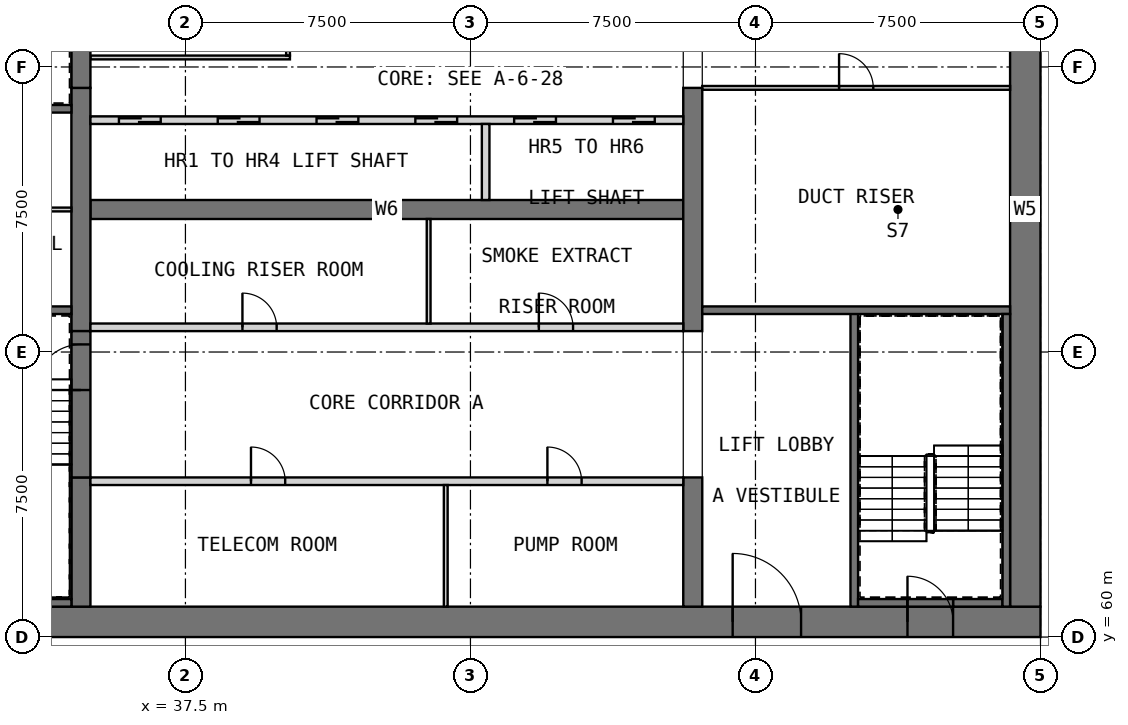
"""IFC4 building model, lengths in metres.
Left out: names, types, materials, properties, quantities, classifications, styles, units other than length and angle.
Written with IfcOpenShell. Run it as: python <this file> out.ifc"""

import sys

from ifc_helpers import new_model, si_unit, direction, frame, frame_2d, origin, place, context, subcontext, project, spatial, rectangle, extrude, element, fill, save


model = new_model("IFC4")
c1 = context("Model", 3, precision=1e-05, world=origin(), true_north=direction((0.0, 1.0)))
c2 = subcontext(c1, "Body", "Model", "MODEL_VIEW")
j1 = project(units=[si_unit("LENGTHUNIT", "METRE"), si_unit("PLANEANGLEUNIT", "RADIAN")], contexts=[c1])
p1 = place(None, origin())
s1 = spatial("IfcSite", under=j1, at=p1, CompositionType="ELEMENT")
p2 = place(p1, origin())
s2 = spatial("IfcBuilding", under=s1, at=p2, CompositionType="ELEMENT")
p3 = place(p2, frame((0.0, 0.0, 214.2)))
s3 = spatial("IfcBuildingStorey", under=s2, at=p3, CompositionType="ELEMENT", Elevation=214.2)
p4 = place(p3, frame((30.0, 60.4, 0.0), z_axis=(0.0, 0.0, 1.0), x_axis=(1.0, 0.0, 0.0)))
e1 = element("IfcWall", 1, at=p4, inside=s3, PredefinedType="SHEAR", context=c2, shape_type="SweptSolid", body=[
    extrude(rectangle(XDim=30.0, YDim=0.8, at=frame_2d((15.0, 0.0))), origin(), (0.0, 0.0, 1.0), 5.5),
])
p5 = place(p4, frame((21.9, 0.0, 0.0)))
e2 = element("IfcOpeningElement", 2, at=p5, cuts=e1, PredefinedType="OPENING", context=c2, shape_type="SweptSolid", body=[
    extrude(rectangle(XDim=1.8, YDim=2.1, at=frame_2d((0.9, 1.05))), frame((0.0, 0.41, 0.0), z_axis=(0.0, -1.0, 0.0), x_axis=(1.0, 0.0, 0.0)), (0.0, 0.0, 1.0), 0.82),
])
p6 = place(p4, frame((26.5, 0.0, 0.0)))
e3 = element("IfcOpeningElement", 3, at=p6, cuts=e1, PredefinedType="OPENING", context=c2, shape_type="SweptSolid", body=[
    extrude(rectangle(XDim=1.2, YDim=2.1, at=frame_2d((0.6, 1.05))), frame((0.0, 0.41, 0.0), z_axis=(0.0, -1.0, 0.0), x_axis=(1.0, 0.0, 0.0)), (0.0, 0.0, 1.0), 0.82),
])
p7 = place(p3, frame((59.6, 60.8, 0.0), z_axis=(0.0, 0.0, 1.0), x_axis=(0.0, 1.0, 0.0)))
e4 = element("IfcWall", 4, at=p7, inside=s3, PredefinedType="SHEAR", context=c2, shape_type="SweptSolid", body=[
    extrude(rectangle(XDim=20.9, YDim=0.8, at=frame_2d((10.45, 0.0))), origin(), (0.0, 0.0, 1.0), 5.5),
])
p8 = place(p7, frame((14.7, 0.0, 0.0)))
e5 = element("IfcOpeningElement", 5, at=p8, cuts=e4, PredefinedType="OPENING", context=c2, shape_type="SweptSolid", body=[
    extrude(rectangle(XDim=1.8, YDim=2.1, at=frame_2d((0.9, 1.05))), frame((0.0, 0.41, 0.0), z_axis=(0.0, -1.0, 0.0), x_axis=(1.0, 0.0, 0.0)), (0.0, 0.0, 1.0), 0.82),
])
p9 = place(p3, frame((35.0, 71.25, 0.0), z_axis=(0.0, 0.0, 1.0), x_axis=(1.0, 0.0, 0.0)))
e6 = element("IfcWall", 6, at=p9, inside=s3, PredefinedType="SHEAR", context=c2, shape_type="SweptSolid", body=[
    extrude(rectangle(XDim=15.6, YDim=0.5, at=frame_2d((7.8, 0.0))), origin(), (0.0, 0.0, 1.0), 5.5),
])
p10 = place(p3, frame((34.75, 60.8, 0.0), z_axis=(0.0, 0.0, 1.0), x_axis=(0.0, 1.0, 0.0)))
e7 = element("IfcWall", 7, at=p10, inside=s3, PredefinedType="SHEAR", context=c2, shape_type="SweptSolid", body=[
    extrude(rectangle(XDim=3.4, YDim=0.5, at=frame_2d((1.7, 0.0))), origin(), (0.0, 0.0, 1.0), 5.5),
])
p11 = place(p3, frame((34.75, 68.05, 0.0), z_axis=(0.0, 0.0, 1.0), x_axis=(0.0, 1.0, 0.0)))
e8 = element("IfcWall", 8, at=p11, inside=s3, PredefinedType="SHEAR", context=c2, shape_type="SweptSolid", body=[
    extrude(rectangle(XDim=6.4, YDim=0.5, at=frame_2d((3.2, 0.0))), origin(), (0.0, 0.0, 1.0), 5.5),
])
p12 = place(p3, frame((50.85, 60.8, 0.0), z_axis=(0.0, 0.0, 1.0), x_axis=(0.0, 1.0, 0.0)))
e9 = element("IfcWall", 9, at=p12, inside=s3, PredefinedType="SHEAR", context=c2, shape_type="SweptSolid", body=[
    extrude(rectangle(XDim=3.4, YDim=0.5, at=frame_2d((1.7, 0.0))), origin(), (0.0, 0.0, 1.0), 5.5),
])
p13 = place(p3, frame((50.85, 68.05, 0.0), z_axis=(0.0, 0.0, 1.0), x_axis=(0.0, 1.0, 0.0)))
e10 = element("IfcWall", 10, at=p13, inside=s3, PredefinedType="SHEAR", context=c2, shape_type="SweptSolid", body=[
    extrude(rectangle(XDim=6.4, YDim=0.5, at=frame_2d((3.2, 0.0))), origin(), (0.0, 0.0, 1.0), 5.5),
])
p14 = place(p3, frame((35.0, 64.1, 0.0), z_axis=(0.0, 0.0, 1.0), x_axis=(1.0, 0.0, 0.0)))
e11 = element("IfcWall", 11, at=p14, inside=s3, PredefinedType="PARTITIONING", context=c2, shape_type="SweptSolid", body=[
    extrude(rectangle(XDim=15.6, YDim=0.2, at=frame_2d((7.8, 0.0))), origin(), (0.0, 0.0, 1.0), 5.25),
])
p15 = place(p14, frame((4.225, 0.0, 0.0)))
e12 = element("IfcOpeningElement", 12, at=p15, cuts=e11, PredefinedType="OPENING", context=c2, shape_type="SweptSolid", body=[
    extrude(rectangle(XDim=0.9, YDim=2.1, at=frame_2d((0.45, 1.05))), frame((0.0, 0.11, 0.0), z_axis=(0.0, -1.0, 0.0), x_axis=(1.0, 0.0, 0.0)), (0.0, 0.0, 1.0), 0.22),
])
p16 = place(p14, frame((12.025, 0.0, 0.0)))
e13 = element("IfcOpeningElement", 13, at=p16, cuts=e11, PredefinedType="OPENING", context=c2, shape_type="SweptSolid", body=[
    extrude(rectangle(XDim=0.9, YDim=2.1, at=frame_2d((0.45, 1.05))), frame((0.0, 0.11, 0.0), z_axis=(0.0, -1.0, 0.0), x_axis=(1.0, 0.0, 0.0)), (0.0, 0.0, 1.0), 0.22),
])
p17 = place(p3, frame((44.35, 60.8, 0.0), z_axis=(0.0, 0.0, 1.0), x_axis=(0.0, 1.0, 0.0)))
e14 = element("IfcWall", 14, at=p17, inside=s3, PredefinedType="PARTITIONING", context=c2, shape_type="SweptSolid", body=[
    extrude(rectangle(XDim=3.2, YDim=0.1, at=frame_2d((1.6, 0.0))), origin(), (0.0, 0.0, 1.0), 5.25),
])
p18 = place(p3, frame((35.0, 68.15, 0.0), z_axis=(0.0, 0.0, 1.0), x_axis=(1.0, 0.0, 0.0)))
e15 = element("IfcWall", 15, at=p18, inside=s3, PredefinedType="PARTITIONING", context=c2, shape_type="SweptSolid", body=[
    extrude(rectangle(XDim=15.6, YDim=0.2, at=frame_2d((7.8, 0.0))), origin(), (0.0, 0.0, 1.0), 5.25),
])
p19 = place(p18, frame((4.0, 0.0, 0.0)))
e16 = element("IfcOpeningElement", 16, at=p19, cuts=e15, PredefinedType="OPENING", context=c2, shape_type="SweptSolid", body=[
    extrude(rectangle(XDim=0.9, YDim=2.1, at=frame_2d((0.45, 1.05))), frame((0.0, 0.11, 0.0), z_axis=(0.0, -1.0, 0.0), x_axis=(1.0, 0.0, 0.0)), (0.0, 0.0, 1.0), 0.22),
])
p20 = place(p18, frame((11.8, 0.0, 0.0)))
e17 = element("IfcOpeningElement", 17, at=p20, cuts=e15, PredefinedType="OPENING", context=c2, shape_type="SweptSolid", body=[
    extrude(rectangle(XDim=0.9, YDim=2.1, at=frame_2d((0.45, 1.05))), frame((0.0, 0.11, 0.0), z_axis=(0.0, -1.0, 0.0), x_axis=(1.0, 0.0, 0.0)), (0.0, 0.0, 1.0), 0.22),
])
p21 = place(p3, frame((43.9, 68.25, 0.0), z_axis=(0.0, 0.0, 1.0), x_axis=(0.0, 1.0, 0.0)))
e18 = element("IfcWall", 18, at=p21, inside=s3, PredefinedType="PARTITIONING", context=c2, shape_type="SweptSolid", body=[
    extrude(rectangle(XDim=2.75, YDim=0.1, at=frame_2d((1.375, 0.0))), origin(), (0.0, 0.0, 1.0), 5.25),
])
p22 = place(p3, frame((35.0, 73.6, 0.0), z_axis=(0.0, 0.0, 1.0), x_axis=(1.0, 0.0, 0.0)))
e19 = element("IfcWall", 19, at=p22, inside=s3, PredefinedType="SOLIDWALL", context=c2, shape_type="SweptSolid", body=[
    extrude(rectangle(XDim=15.6, YDim=0.2, at=frame_2d((7.8, 0.0))), origin(), (0.0, 0.0, 1.0), 5.5),
])
p23 = place(p22, frame((0.75, 0.0, 0.0)))
e20 = element("IfcOpeningElement", 20, at=p23, cuts=e19, PredefinedType="OPENING", context=c2, shape_type="SweptSolid", body=[
    extrude(rectangle(XDim=1.1, YDim=2.1, at=frame_2d((0.55, 1.05))), frame((0.0, 0.11, 0.0), z_axis=(0.0, -1.0, 0.0), x_axis=(1.0, 0.0, 0.0)), (0.0, 0.0, 1.0), 0.22),
])
p24 = place(p22, frame((3.35, 0.0, 0.0)))
e21 = element("IfcOpeningElement", 21, at=p24, cuts=e19, PredefinedType="OPENING", context=c2, shape_type="SweptSolid", body=[
    extrude(rectangle(XDim=1.1, YDim=2.1, at=frame_2d((0.55, 1.05))), frame((0.0, 0.11, 0.0), z_axis=(0.0, -1.0, 0.0), x_axis=(1.0, 0.0, 0.0)), (0.0, 0.0, 1.0), 0.22),
])
p25 = place(p22, frame((5.95, 0.0, 0.0)))
e22 = element("IfcOpeningElement", 22, at=p25, cuts=e19, PredefinedType="OPENING", context=c2, shape_type="SweptSolid", body=[
    extrude(rectangle(XDim=1.1, YDim=2.1, at=frame_2d((0.55, 1.05))), frame((0.0, 0.11, 0.0), z_axis=(0.0, -1.0, 0.0), x_axis=(1.0, 0.0, 0.0)), (0.0, 0.0, 1.0), 0.22),
])
p26 = place(p22, frame((8.55, 0.0, 0.0)))
e23 = element("IfcOpeningElement", 23, at=p26, cuts=e19, PredefinedType="OPENING", context=c2, shape_type="SweptSolid", body=[
    extrude(rectangle(XDim=1.1, YDim=2.1, at=frame_2d((0.55, 1.05))), frame((0.0, 0.11, 0.0), z_axis=(0.0, -1.0, 0.0), x_axis=(1.0, 0.0, 0.0)), (0.0, 0.0, 1.0), 0.22),
])
p27 = place(p22, frame((11.15, 0.0, 0.0)))
e24 = element("IfcOpeningElement", 24, at=p27, cuts=e19, PredefinedType="OPENING", context=c2, shape_type="SweptSolid", body=[
    extrude(rectangle(XDim=1.1, YDim=2.1, at=frame_2d((0.55, 1.05))), frame((0.0, 0.11, 0.0), z_axis=(0.0, -1.0, 0.0), x_axis=(1.0, 0.0, 0.0)), (0.0, 0.0, 1.0), 0.22),
])
p28 = place(p22, frame((13.75, 0.0, 0.0)))
e25 = element("IfcOpeningElement", 25, at=p28, cuts=e19, PredefinedType="OPENING", context=c2, shape_type="SweptSolid", body=[
    extrude(rectangle(XDim=1.1, YDim=2.1, at=frame_2d((0.55, 1.05))), frame((0.0, 0.11, 0.0), z_axis=(0.0, -1.0, 0.0), x_axis=(1.0, 0.0, 0.0)), (0.0, 0.0, 1.0), 0.22),
])
p29 = place(p3, frame((45.4, 71.5, 0.0), z_axis=(0.0, 0.0, 1.0), x_axis=(0.0, 1.0, 0.0)))
e26 = element("IfcWall", 26, at=p29, inside=s3, PredefinedType="SOLIDWALL", context=c2, shape_type="SweptSolid", body=[
    extrude(rectangle(XDim=2.0, YDim=0.2, at=frame_2d((1.0, 0.0))), origin(), (0.0, 0.0, 1.0), 5.5),
])
p30 = place(p3, frame((35.0, 75.25, 0.0), z_axis=(0.0, 0.0, 1.0), x_axis=(1.0, 0.0, 0.0)))
e27 = element("IfcWall", 27, at=p30, inside=s3, PredefinedType="PARTITIONING", context=c2, shape_type="SweptSolid", body=[
    extrude(rectangle(XDim=5.25, YDim=0.1, at=frame_2d((2.625, 0.0))), origin(), (0.0, 0.0, 1.0), 5.25),
])
p31 = place(p3, frame((40.2, 75.3, 0.0), z_axis=(0.0, 0.0, 1.0), x_axis=(0.0, 1.0, 0.0)))
e28 = element("IfcWall", 28, at=p31, inside=s3, PredefinedType="PARTITIONING", context=c2, shape_type="SweptSolid", body=[
    extrude(rectangle(XDim=3.0, YDim=0.1, at=frame_2d((1.5, 0.0))), origin(), (0.0, 0.0, 1.0), 5.25),
])
p32 = place(p31, frame((1.2, 0.0, 0.0)))
e29 = element("IfcOpeningElement", 29, at=p32, cuts=e28, PredefinedType="OPENING", context=c2, shape_type="SweptSolid", body=[
    extrude(rectangle(XDim=1.1, YDim=2.1, at=frame_2d((0.55, 1.05))), frame((0.0, 0.06, 0.0), z_axis=(0.0, -1.0, 0.0), x_axis=(1.0, 0.0, 0.0)), (0.0, 0.0, 1.0), 0.12),
])
p33 = place(p3, frame((34.75, 64.2, 0.0), z_axis=(0.0, 0.0, 1.0), x_axis=(0.0, 1.0, 0.0)))
e30 = element("IfcWall", 30, at=p33, inside=s3, PredefinedType="SOLIDWALL", context=c2, shape_type="SweptSolid", body=[
    extrude(rectangle(XDim=3.85, YDim=0.5, at=frame_2d((1.925, 0.0))), origin(), (0.0, 0.0, 1.0), 4.3),
])
p34 = place(p33, frame((2.3, 0.0, 0.0)))
e31 = element("IfcOpeningElement", 31, at=p34, cuts=e30, PredefinedType="OPENING", context=c2, shape_type="SweptSolid", body=[
    extrude(rectangle(XDim=1.2, YDim=2.1, at=frame_2d((0.6, 1.05))), frame((0.0, 0.26, 0.0), z_axis=(0.0, -1.0, 0.0), x_axis=(1.0, 0.0, 0.0)), (0.0, 0.0, 1.0), 0.52),
])
p35 = place(p3, frame((34.75, 74.45, 0.0), z_axis=(0.0, 0.0, 1.0), x_axis=(0.0, 1.0, 0.0)))
e32 = element("IfcWall", 32, at=p35, inside=s3, PredefinedType="SOLIDWALL", context=c2, shape_type="SweptSolid", body=[
    extrude(rectangle(XDim=3.85, YDim=0.5, at=frame_2d((1.925, 0.0))), origin(), (0.0, 0.0, 1.0), 4.3),
])
p36 = place(p35, frame((1.0, 0.0, 0.0)))
e33 = element("IfcOpeningElement", 33, at=p36, cuts=e32, PredefinedType="OPENING", context=c2, shape_type="SweptSolid", body=[
    extrude(rectangle(XDim=1.2, YDim=2.1, at=frame_2d((0.6, 1.05))), frame((0.0, 0.26, 0.0), z_axis=(0.0, -1.0, 0.0), x_axis=(1.0, 0.0, 0.0)), (0.0, 0.0, 1.0), 0.52),
])
p37 = place(p3, frame((30.8, 68.6, 0.0), z_axis=(0.0, 0.0, 1.0), x_axis=(1.0, 0.0, 0.0)))
e34 = element("IfcWall", 34, at=p37, inside=s3, PredefinedType="SOLIDWALL", context=c2, shape_type="SweptSolid", body=[
    extrude(rectangle(XDim=3.7, YDim=0.2, at=frame_2d((1.85, 0.0))), origin(), (0.0, 0.0, 1.0), 5.25),
])
p38 = place(p37, frame((1.5, 0.0, 0.0)))
e35 = element("IfcOpeningElement", 35, at=p38, cuts=e34, PredefinedType="OPENING", context=c2, shape_type="SweptSolid", body=[
    extrude(rectangle(XDim=0.9, YDim=2.1, at=frame_2d((0.45, 1.05))), frame((0.0, 0.11, 0.0), z_axis=(0.0, -1.0, 0.0), x_axis=(1.0, 0.0, 0.0)), (0.0, 0.0, 1.0), 0.22),
])
p39 = place(p3, frame((30.8, 73.9, 0.0), z_axis=(0.0, 0.0, 1.0), x_axis=(1.0, 0.0, 0.0)))
e36 = element("IfcWall", 36, at=p39, inside=s3, PredefinedType="SOLIDWALL", context=c2, shape_type="SweptSolid", body=[
    extrude(rectangle(XDim=3.7, YDim=0.2, at=frame_2d((1.85, 0.0))), origin(), (0.0, 0.0, 1.0), 5.25),
])
p40 = place(p39, frame((1.5, 0.0, 0.0)))
e37 = element("IfcOpeningElement", 37, at=p40, cuts=e36, PredefinedType="OPENING", context=c2, shape_type="SweptSolid", body=[
    extrude(rectangle(XDim=0.9, YDim=2.1, at=frame_2d((0.45, 1.05))), frame((0.0, 0.11, 0.0), z_axis=(0.0, -1.0, 0.0), x_axis=(1.0, 0.0, 0.0)), (0.0, 0.0, 1.0), 0.22),
])
p41 = place(p3, frame((55.1, 60.8, 0.0), z_axis=(0.0, 0.0, 1.0), x_axis=(0.0, 1.0, 0.0)))
e38 = element("IfcWall", 38, at=p41, inside=s3, PredefinedType="SOLIDWALL", context=c2, shape_type="SweptSolid", body=[
    extrude(rectangle(XDim=7.8, YDim=0.2, at=frame_2d((3.9, 0.0))), origin(), (0.0, 0.0, 1.0), 5.25),
])
p42 = place(p3, frame((51.1, 68.6, 0.0), z_axis=(0.0, 0.0, 1.0), x_axis=(1.0, 0.0, 0.0)))
e39 = element("IfcWall", 39, at=p42, inside=s3, PredefinedType="SOLIDWALL", context=c2, shape_type="SweptSolid", body=[
    extrude(rectangle(XDim=8.1, YDim=0.2, at=frame_2d((4.05, 0.0))), origin(), (0.0, 0.0, 1.0), 5.25),
])
p43 = place(p3, frame((31.0, 60.9, 0.0), z_axis=(0.0, 0.0, 1.0), x_axis=(1.0, 0.0, 0.0)))
e40 = element("IfcWall", 40, at=p43, inside=s3, PredefinedType="SOLIDWALL", context=c2, shape_type="SweptSolid", body=[
    extrude(rectangle(XDim=3.5, YDim=0.2, at=frame_2d((1.75, 0.0))), origin(), (0.0, 0.0, 1.0), 5.25),
])
for number, where, z_axis, x_axis in (
    (41, (55.2, 60.9, 0.0), (0.0, 0.0, 1.0), (1.0, 0.0, 0.0)),
    (42, (57.7, 60.9, 0.0), (0.0, 0.0, 1.0), (1.0, 0.0, 0.0)),
):
    element("IfcWall", number, at=place(p3, frame(where, z_axis=z_axis, x_axis=x_axis)), inside=s3, PredefinedType="SOLIDWALL", context=c2, shape_type="SweptSolid", body=[
        extrude(rectangle(XDim=1.3, YDim=0.2, at=frame_2d((0.65, 0.0))), origin(), (0.0, 0.0, 1.0), 5.25),
    ])
p44 = place(p3, frame((59.1, 60.8, 0.0), z_axis=(0.0, 0.0, 1.0), x_axis=(0.0, 1.0, 0.0)))
e43 = element("IfcWall", 43, at=p44, inside=s3, PredefinedType="SOLIDWALL", context=c2, shape_type="SweptSolid", body=[
    extrude(rectangle(XDim=7.7, YDim=0.2, at=frame_2d((3.85, 0.0))), origin(), (0.0, 0.0, 1.0), 5.25),
])
p45 = place(p3, frame((56.5, 60.9, 3.2), z_axis=(0.0, 0.0, 1.0), x_axis=(1.0, 0.0, 0.0)))
e44 = element("IfcWall", 44, at=p45, inside=s3, PredefinedType="SOLIDWALL", context=c2, shape_type="SweptSolid", body=[
    extrude(rectangle(XDim=1.2, YDim=0.2, at=frame_2d((0.6, 0.0))), origin(), (0.0, 0.0, 1.0), 2.05),
])
p46 = place(p3, frame((30.8, 71.25, 0.0), z_axis=(0.0, 0.0, 1.0), x_axis=(1.0, 0.0, 0.0)))
e45 = element("IfcWall", 45, at=p46, inside=s3, PredefinedType="PARTITIONING", context=c2, shape_type="SweptSolid", body=[
    extrude(rectangle(XDim=3.7, YDim=0.1, at=frame_2d((1.85, 0.0))), origin(), (0.0, 0.0, 1.0), 5.25),
])
p47 = place(p3, frame((51.1, 74.45, 0.0), z_axis=(0.0, 0.0, 1.0), x_axis=(1.0, 0.0, 0.0)))
e46 = element("IfcWall", 46, at=p47, inside=s3, PredefinedType="PARTITIONING", context=c2, shape_type="SweptSolid", body=[
    extrude(rectangle(XDim=8.1, YDim=0.1, at=frame_2d((4.05, 0.0))), origin(), (0.0, 0.0, 1.0), 5.25),
])
p48 = place(p47, frame((3.6, 0.0, 0.0)))
e47 = element("IfcOpeningElement", 47, at=p48, cuts=e46, PredefinedType="OPENING", context=c2, shape_type="SweptSolid", body=[
    extrude(rectangle(XDim=0.9, YDim=2.1, at=frame_2d((0.45, 1.05))), frame((0.0, 0.06, 0.0), z_axis=(0.0, -1.0, 0.0), x_axis=(1.0, 0.0, 0.0)), (0.0, 0.0, 1.0), 0.12),
])
p49 = place(p15, origin())
e48 = element("IfcDoor", 48, at=p49, inside=s3, OperationType="SINGLE_SWING_LEFT", PredefinedType="DOOR", context=c2, shape_type="SweptSolid", body=[
    extrude(rectangle(XDim=0.9, YDim=2.1, at=frame_2d((0.45, 1.05))), frame((0.0, 0.025, 0.0), z_axis=(0.0, -1.0, 0.0), x_axis=(1.0, 0.0, 0.0)), (0.0, 0.0, 1.0), 0.05),
])
fill(e12, e48)
p50 = place(p16, origin())
e49 = element("IfcDoor", 49, at=p50, inside=s3, OperationType="SINGLE_SWING_RIGHT", PredefinedType="DOOR", context=c2, shape_type="SweptSolid", body=[
    extrude(rectangle(XDim=0.9, YDim=2.1, at=frame_2d((0.45, 1.05))), frame((0.0, 0.025, 0.0), z_axis=(0.0, -1.0, 0.0), x_axis=(1.0, 0.0, 0.0)), (0.0, 0.0, 1.0), 0.05),
])
fill(e13, e49)
p51 = place(p19, origin())
e50 = element("IfcDoor", 50, at=p51, inside=s3, OperationType="SINGLE_SWING_LEFT", PredefinedType="DOOR", context=c2, shape_type="SweptSolid", body=[
    extrude(rectangle(XDim=0.9, YDim=2.1, at=frame_2d((0.45, 1.05))), frame((0.0, 0.025, 0.0), z_axis=(0.0, -1.0, 0.0), x_axis=(1.0, 0.0, 0.0)), (0.0, 0.0, 1.0), 0.05),
])
fill(e16, e50)
p52 = place(p20, origin())
e51 = element("IfcDoor", 51, at=p52, inside=s3, OperationType="SINGLE_SWING_RIGHT", PredefinedType="DOOR", context=c2, shape_type="SweptSolid", body=[
    extrude(rectangle(XDim=0.9, YDim=2.1, at=frame_2d((0.45, 1.05))), frame((0.0, 0.025, 0.0), z_axis=(0.0, -1.0, 0.0), x_axis=(1.0, 0.0, 0.0)), (0.0, 0.0, 1.0), 0.05),
])
fill(e17, e51)
p53 = place(p23, origin())
e52 = element("IfcDoor", 52, at=p53, inside=s3, OperationType="DOUBLE_DOOR_SLIDING", PredefinedType="DOOR", context=c2, shape_type="SweptSolid", body=[
    extrude(rectangle(XDim=1.1, YDim=2.1, at=frame_2d((0.55, 1.05))), frame((0.0, 0.025, 0.0), z_axis=(0.0, -1.0, 0.0), x_axis=(1.0, 0.0, 0.0)), (0.0, 0.0, 1.0), 0.05),
])
fill(e20, e52)
p54 = place(p24, origin())
e53 = element("IfcDoor", 53, at=p54, inside=s3, OperationType="DOUBLE_DOOR_SLIDING", PredefinedType="DOOR", context=c2, shape_type="SweptSolid", body=[
    extrude(rectangle(XDim=1.1, YDim=2.1, at=frame_2d((0.55, 1.05))), frame((0.0, 0.025, 0.0), z_axis=(0.0, -1.0, 0.0), x_axis=(1.0, 0.0, 0.0)), (0.0, 0.0, 1.0), 0.05),
])
fill(e21, e53)
p55 = place(p25, origin())
e54 = element("IfcDoor", 54, at=p55, inside=s3, OperationType="DOUBLE_DOOR_SLIDING", PredefinedType="DOOR", context=c2, shape_type="SweptSolid", body=[
    extrude(rectangle(XDim=1.1, YDim=2.1, at=frame_2d((0.55, 1.05))), frame((0.0, 0.025, 0.0), z_axis=(0.0, -1.0, 0.0), x_axis=(1.0, 0.0, 0.0)), (0.0, 0.0, 1.0), 0.05),
])
fill(e22, e54)
p56 = place(p26, origin())
e55 = element("IfcDoor", 55, at=p56, inside=s3, OperationType="DOUBLE_DOOR_SLIDING", PredefinedType="DOOR", context=c2, shape_type="SweptSolid", body=[
    extrude(rectangle(XDim=1.1, YDim=2.1, at=frame_2d((0.55, 1.05))), frame((0.0, 0.025, 0.0), z_axis=(0.0, -1.0, 0.0), x_axis=(1.0, 0.0, 0.0)), (0.0, 0.0, 1.0), 0.05),
])
fill(e23, e55)
p57 = place(p27, origin())
e56 = element("IfcDoor", 56, at=p57, inside=s3, OperationType="DOUBLE_DOOR_SLIDING", PredefinedType="DOOR", context=c2, shape_type="SweptSolid", body=[
    extrude(rectangle(XDim=1.1, YDim=2.1, at=frame_2d((0.55, 1.05))), frame((0.0, 0.025, 0.0), z_axis=(0.0, -1.0, 0.0), x_axis=(1.0, 0.0, 0.0)), (0.0, 0.0, 1.0), 0.05),
])
fill(e24, e56)
p58 = place(p28, origin())
e57 = element("IfcDoor", 57, at=p58, inside=s3, OperationType="DOUBLE_DOOR_SLIDING", PredefinedType="DOOR", context=c2, shape_type="SweptSolid", body=[
    extrude(rectangle(XDim=1.1, YDim=2.1, at=frame_2d((0.55, 1.05))), frame((0.0, 0.025, 0.0), z_axis=(0.0, -1.0, 0.0), x_axis=(1.0, 0.0, 0.0)), (0.0, 0.0, 1.0), 0.05),
])
fill(e25, e57)
p59 = place(p5, origin())
e58 = element("IfcDoor", 58, at=p59, inside=s3, OperationType="DOUBLE_DOOR_SINGLE_SWING", PredefinedType="DOOR", context=c2, shape_type="SweptSolid", body=[
    extrude(rectangle(XDim=1.8, YDim=2.1, at=frame_2d((0.9, 1.05))), frame((0.0, 0.025, 0.0), z_axis=(0.0, -1.0, 0.0), x_axis=(1.0, 0.0, 0.0)), (0.0, 0.0, 1.0), 0.05),
])
fill(e2, e58)
p60 = place(p34, origin())
e59 = element("IfcDoor", 59, at=p60, inside=s3, OperationType="SINGLE_SWING_LEFT", PredefinedType="DOOR", context=c2, shape_type="SweptSolid", body=[
    extrude(rectangle(XDim=1.2, YDim=2.1, at=frame_2d((0.6, 1.05))), frame((0.0, 0.025, 0.0), z_axis=(0.0, -1.0, 0.0), x_axis=(1.0, 0.0, 0.0)), (0.0, 0.0, 1.0), 0.05),
])
fill(e31, e59)
p61 = place(p6, origin())
e60 = element("IfcDoor", 60, at=p61, inside=s3, OperationType="SINGLE_SWING_LEFT", PredefinedType="DOOR", context=c2, shape_type="SweptSolid", body=[
    extrude(rectangle(XDim=1.2, YDim=2.1, at=frame_2d((0.6, 1.05))), frame((0.0, 0.025, 0.0), z_axis=(0.0, -1.0, 0.0), x_axis=(1.0, 0.0, 0.0)), (0.0, 0.0, 1.0), 0.05),
])
fill(e3, e60)
p62 = place(p48, origin())
e61 = element("IfcDoor", 61, at=p62, inside=s3, OperationType="SINGLE_SWING_LEFT", PredefinedType="DOOR", context=c2, shape_type="SweptSolid", body=[
    extrude(rectangle(XDim=0.9, YDim=2.1, at=frame_2d((0.45, 1.05))), frame((0.0, 0.025, 0.0), z_axis=(0.0, -1.0, 0.0), x_axis=(1.0, 0.0, 0.0)), (0.0, 0.0, 1.0), 0.05),
])
fill(e47, e61)
save(model, sys.argv[1])
